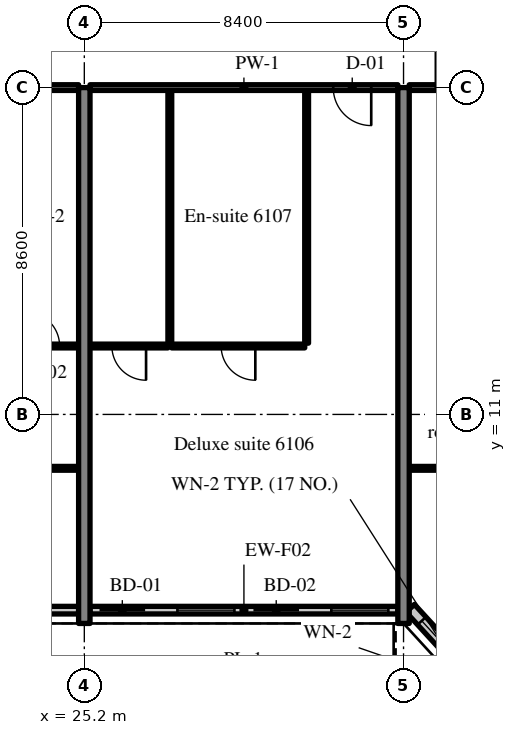
"""IFC4 building model, lengths in metres.
Left out: names, types, materials, properties, quantities, classifications, styles, units other than length and angle.
Written with IfcOpenShell. Run it as: python <this file> out.ifc"""

import sys

from ifc_helpers import new_model, si_unit, direction, frame, frame_2d, origin, place, context, subcontext, project, spatial, rectangle, extrude, source, transform, mapped, element, fill, save


model = new_model("IFC4")
c1 = context("Model", 3, precision=1e-05, world=origin(), true_north=direction((0.0, 1.0)))
c2 = subcontext(c1, "Body", "Model", "MODEL_VIEW")
j1 = project(units=[si_unit("LENGTHUNIT", "METRE"), si_unit("PLANEANGLEUNIT", "RADIAN")], contexts=[c1])
p1 = place(None, origin())
s1 = spatial("IfcSite", under=j1, at=p1, CompositionType="ELEMENT")
p2 = place(p1, origin())
s2 = spatial("IfcBuilding", under=s1, at=p2, CompositionType="ELEMENT")
p3 = place(p2, frame((0.0, 0.0, 253.0)))
s3 = spatial("IfcBuildingStorey", under=s2, at=p3, CompositionType="ELEMENT", Elevation=253.0)
m1 = source(origin(), c2, "Body", "SweptSolid", [
    extrude(rectangle(XDim=14.1, YDim=0.3, at=frame_2d((7.05, 0.0))), origin(), (0.0, 0.0, 1.0), 3.62),
])
for number, where, z_axis, x_axis in (
    (1, (25.2, 5.5, 0.0), (0.0, 0.0, 1.0), (0.0, 1.0, 0.0)),
    (2, (33.6, 5.5, 0.0), (0.0, 0.0, 1.0), (0.0, 1.0, 0.0)),
):
    element("IfcWall", number, at=place(p3, frame(where, z_axis=z_axis, x_axis=x_axis)), inside=s3, PredefinedType="SHEAR", context=c2, shape_type="MappedRepresentation", body=[
        mapped(m1, transform((0.0, 0.0, 0.0), scale=1.0)),
    ])
m2 = source(origin(), c2, "Body", "SweptSolid", [
    extrude(rectangle(XDim=6.505, YDim=0.2, at=frame_2d((3.252, 0.0))), origin(), (0.0, 0.0, 1.0), 3.02),
])
p4 = place(p3, frame((18.545, 5.85, 0.0), z_axis=(0.0, 0.0, 1.0), x_axis=(1.0, 0.0, 0.0)))
e3 = element("IfcWall", 3, at=p4, inside=s3, PredefinedType="SOLIDWALL", context=c2, shape_type="MappedRepresentation", body=[
    mapped(m2, transform((0.0, 0.0, 0.0), scale=1.0)),
])
m3 = source(origin(), c2, "Body", "SweptSolid", [
    extrude(rectangle(XDim=1.5, YDim=1.5, at=frame_2d((0.75, 0.75))), frame((0.0, 0.11, 0.0), z_axis=(0.0, -1.0, 0.0), x_axis=(1.0, 0.0, 0.0)), (0.0, 0.0, 1.0), 0.22),
])
p5 = place(p4, frame((0.876, 0.0, 0.9)))
e4 = element("IfcOpeningElement", 4, at=p5, cuts=e3, PredefinedType="OPENING", context=c2, shape_type="MappedRepresentation", body=[
    mapped(m3, transform((0.0, 0.0, 0.0), scale=1.0)),
])
p6 = place(p4, frame((4.129, 0.0, 0.9)))
e5 = element("IfcOpeningElement", 5, at=p6, cuts=e3, PredefinedType="OPENING", context=c2, shape_type="MappedRepresentation", body=[
    mapped(m3, transform((0.0, 0.0, 0.0), scale=1.0)),
])
m4 = source(origin(), c2, "Body", "SweptSolid", [
    extrude(rectangle(XDim=8.1, YDim=0.2, at=frame_2d((4.05, 0.0))), origin(), (0.0, 0.0, 1.0), 3.02),
])
p7 = place(p3, frame((25.35, 5.85, 0.0), z_axis=(0.0, 0.0, 1.0), x_axis=(1.0, 0.0, 0.0)))
e6 = element("IfcWall", 6, at=p7, inside=s3, PredefinedType="SOLIDWALL", context=c2, shape_type="MappedRepresentation", body=[
    mapped(m4, transform((0.0, 0.0, 0.0), scale=1.0)),
])
m5 = source(origin(), c2, "Body", "SweptSolid", [
    extrude(rectangle(XDim=1.2, YDim=2.4, at=frame_2d((0.6, 1.2))), frame((0.0, 0.11, 0.0), z_axis=(0.0, -1.0, 0.0), x_axis=(1.0, 0.0, 0.0)), (0.0, 0.0, 1.0), 0.22),
])
p8 = place(p7, frame((0.25, 0.0, 0.0)))
e7 = element("IfcOpeningElement", 7, at=p8, cuts=e6, PredefinedType="OPENING", context=c2, shape_type="MappedRepresentation", body=[
    mapped(m5, transform((0.0, 0.0, 0.0), scale=1.0)),
])
p9 = place(p7, frame((2.3, 0.0, 0.9)))
e8 = element("IfcOpeningElement", 8, at=p9, cuts=e6, PredefinedType="OPENING", context=c2, shape_type="MappedRepresentation", body=[
    mapped(m3, transform((0.0, 0.0, 0.0), scale=1.0)),
])
p10 = place(p7, frame((4.3, 0.0, 0.0)))
e9 = element("IfcOpeningElement", 9, at=p10, cuts=e6, PredefinedType="OPENING", context=c2, shape_type="MappedRepresentation", body=[
    mapped(m5, transform((0.0, 0.0, 0.0), scale=1.0)),
])
p11 = place(p7, frame((6.35, 0.0, 0.9)))
e10 = element("IfcOpeningElement", 10, at=p11, cuts=e6, PredefinedType="OPENING", context=c2, shape_type="MappedRepresentation", body=[
    mapped(m3, transform((0.0, 0.0, 0.0), scale=1.0)),
])
m6 = source(origin(), c2, "Body", "SweptSolid", [
    extrude(rectangle(XDim=2.398, YDim=0.3, at=frame_2d((1.199, 0.0))), origin(), (0.0, 0.0, 1.0), 3.62),
])
p12 = place(p3, frame((33.776, 5.9, 0.0), z_axis=(0.0, 0.0, 1.0), x_axis=(0.675374189419, -0.737475222815, 0.0)))
e11 = element("IfcWall", 11, at=p12, inside=s3, PredefinedType="SOLIDWALL", context=c2, shape_type="MappedRepresentation", body=[
    mapped(m6, transform((0.0, 0.0, 0.0), scale=1.0)),
])
m7 = source(origin(), c2, "Body", "SweptSolid", [
    extrude(rectangle(XDim=1.5, YDim=2.0, at=frame_2d((0.75, 1.0))), frame((0.0, 0.16, 0.0), z_axis=(0.0, -1.0, 0.0), x_axis=(1.0, 0.0, 0.0)), (0.0, 0.0, 1.0), 0.32),
])
p13 = place(p12, frame((0.449, 0.0, 0.9)))
e12 = element("IfcOpeningElement", 12, at=p13, cuts=e11, PredefinedType="OPENING", context=c2, shape_type="MappedRepresentation", body=[
    mapped(m7, transform((0.0, 0.0, 0.0), scale=1.0)),
])
m8 = source(origin(), c2, "Body", "SweptSolid", [
    extrude(rectangle(XDim=1.9, YDim=0.1, at=frame_2d((0.95, 0.0))), origin(), (0.0, 0.0, 1.0), 3.62),
])
p14 = place(p3, frame((23.15, 12.8, 0.0), z_axis=(0.0, 0.0, 1.0), x_axis=(1.0, 0.0, 0.0)))
e13 = element("IfcWall", 13, at=p14, inside=s3, PredefinedType="PARTITIONING", context=c2, shape_type="MappedRepresentation", body=[
    mapped(m8, transform((0.0, 0.0, 0.0), scale=1.0)),
])
m9 = source(origin(), c2, "Body", "SweptSolid", [
    extrude(rectangle(XDim=0.9, YDim=2.1, at=frame_2d((0.45, 1.05))), frame((0.0, 0.06, 0.0), z_axis=(0.0, -1.0, 0.0), x_axis=(1.0, 0.0, 0.0)), (0.0, 0.0, 1.0), 0.12),
])
p15 = place(p14, frame((0.5, 0.0, 0.0)))
e14 = element("IfcOpeningElement", 14, at=p15, cuts=e13, PredefinedType="OPENING", context=c2, shape_type="MappedRepresentation", body=[
    mapped(m9, transform((0.0, 0.0, 0.0), scale=1.0)),
])
m10 = source(origin(), c2, "Body", "SweptSolid", [
    extrude(rectangle(XDim=7.95, YDim=0.1, at=frame_2d((3.975, 0.0))), origin(), (0.0, 0.0, 1.0), 3.62),
])
p16 = place(p3, frame((17.1, 9.582, 0.0), z_axis=(0.0, 0.0, 1.0), x_axis=(1.0, 0.0, 0.0)))
e15 = element("IfcWall", 15, at=p16, inside=s3, PredefinedType="PARTITIONING", context=c2, shape_type="MappedRepresentation", body=[
    mapped(m10, transform((0.0, 0.0, 0.0), scale=1.0)),
])
m11 = source(origin(), c2, "Body", "SweptSolid", [
    extrude(rectangle(XDim=1.8, YDim=2.1, at=frame_2d((0.9, 1.05))), frame((0.0, 0.06, 0.0), z_axis=(0.0, -1.0, 0.0), x_axis=(1.0, 0.0, 0.0)), (0.0, 0.0, 1.0), 0.12),
])
p17 = place(p16, frame((3.075, 0.0, 0.0)))
e16 = element("IfcOpeningElement", 16, at=p17, cuts=e15, PredefinedType="OPENING", context=c2, shape_type="MappedRepresentation", body=[
    mapped(m11, transform((0.0, 0.0, 0.0), scale=1.0)),
])
m12 = source(origin(), c2, "Body", "SweptSolid", [
    extrude(rectangle(XDim=7.95, YDim=0.15, at=frame_2d((3.975, 0.0))), origin(), (0.0, 0.0, 1.0), 2.92),
])
p18 = place(p3, frame((17.1, 19.6, 0.0), z_axis=(0.0, 0.0, 1.0), x_axis=(1.0, 0.0, 0.0)))
e17 = element("IfcWall", 17, at=p18, inside=s3, PredefinedType="PARTITIONING", context=c2, shape_type="MappedRepresentation", body=[
    mapped(m12, transform((0.0, 0.0, 0.0), scale=1.0)),
])
m13 = source(origin(), c2, "Body", "SweptSolid", [
    extrude(rectangle(XDim=1.0, YDim=2.1, at=frame_2d((0.5, 1.05))), frame((0.0, 0.085, 0.0), z_axis=(0.0, -1.0, 0.0), x_axis=(1.0, 0.0, 0.0)), (0.0, 0.0, 1.0), 0.17),
])
p19 = place(p18, frame((0.7, 0.0, 0.0)))
e18 = element("IfcOpeningElement", 18, at=p19, cuts=e17, PredefinedType="OPENING", context=c2, shape_type="MappedRepresentation", body=[
    mapped(m13, transform((0.0, 0.0, 0.0), scale=1.0)),
])
m14 = source(origin(), c2, "Body", "SweptSolid", [
    extrude(rectangle(XDim=6.65, YDim=0.1, at=frame_2d((3.325, 0.0))), origin(), (0.0, 0.0, 1.0), 3.62),
])
for number, where, z_axis, x_axis in (
    (19, (31.05, 12.875, 0.0), (0.0, 0.0, 1.0), (0.0, 1.0, 0.0)),
    (20, (27.45, 12.875, 0.0), (0.0, 0.0, 1.0), (0.0, 1.0, 0.0)),
):
    element("IfcWall", number, at=place(p3, frame(where, z_axis=z_axis, x_axis=x_axis)), inside=s3, PredefinedType="PARTITIONING", context=c2, shape_type="MappedRepresentation", body=[
        mapped(m14, transform((0.0, 0.0, 0.0), scale=1.0)),
    ])
m15 = source(origin(), c2, "Body", "SweptSolid", [
    extrude(rectangle(XDim=3.5, YDim=0.1, at=frame_2d((1.75, 0.0))), origin(), (0.0, 0.0, 1.0), 3.62),
])
p20 = place(p3, frame((27.5, 12.8, 0.0), z_axis=(0.0, 0.0, 1.0), x_axis=(1.0, 0.0, 0.0)))
e21 = element("IfcWall", 21, at=p20, inside=s3, PredefinedType="PARTITIONING", context=c2, shape_type="MappedRepresentation", body=[
    mapped(m15, transform((0.0, 0.0, 0.0), scale=1.0)),
])
p21 = place(p20, frame((1.3, 0.0, 0.0)))
e22 = element("IfcOpeningElement", 22, at=p21, cuts=e21, PredefinedType="OPENING", context=c2, shape_type="MappedRepresentation", body=[
    mapped(m9, transform((0.0, 0.0, 0.0), scale=1.0)),
])
m16 = source(origin(), c2, "Body", "SweptSolid", [
    extrude(rectangle(XDim=2.05, YDim=0.1, at=frame_2d((1.025, 0.0))), origin(), (0.0, 0.0, 1.0), 3.62),
])
p22 = place(p3, frame((25.35, 12.8, 0.0), z_axis=(0.0, 0.0, 1.0), x_axis=(1.0, 0.0, 0.0)))
e23 = element("IfcWall", 23, at=p22, inside=s3, PredefinedType="PARTITIONING", context=c2, shape_type="MappedRepresentation", body=[
    mapped(m16, transform((0.0, 0.0, 0.0), scale=1.0)),
])
p23 = place(p22, frame((0.575, 0.0, 0.0)))
e24 = element("IfcOpeningElement", 24, at=p23, cuts=e23, PredefinedType="OPENING", context=c2, shape_type="MappedRepresentation", body=[
    mapped(m9, transform((0.0, 0.0, 0.0), scale=1.0)),
])
m17 = source(origin(), c2, "Body", "SweptSolid", [
    extrude(rectangle(XDim=8.1, YDim=0.15, at=frame_2d((4.05, 0.0))), origin(), (0.0, 0.0, 1.0), 2.92),
])
p24 = place(p3, frame((25.35, 19.6, 0.0), z_axis=(0.0, 0.0, 1.0), x_axis=(1.0, 0.0, 0.0)))
e25 = element("IfcWall", 25, at=p24, inside=s3, PredefinedType="PARTITIONING", context=c2, shape_type="MappedRepresentation", body=[
    mapped(m17, transform((0.0, 0.0, 0.0), scale=1.0)),
])
p25 = place(p24, frame((6.4, 0.0, 0.0)))
e26 = element("IfcOpeningElement", 26, at=p25, cuts=e25, PredefinedType="OPENING", context=c2, shape_type="MappedRepresentation", body=[
    mapped(m13, transform((0.0, 0.0, 0.0), scale=1.0)),
])
m18 = source(origin(), c2, "Body", "SweptSolid", [
    extrude(rectangle(XDim=8.1, YDim=0.1, at=frame_2d((4.05, 0.0))), origin(), (0.0, 0.0, 1.0), 3.62),
])
p26 = place(p3, frame((33.75, 9.582, 0.0), z_axis=(0.0, 0.0, 1.0), x_axis=(1.0, 0.0, 0.0)))
e27 = element("IfcWall", 27, at=p26, inside=s3, PredefinedType="PARTITIONING", context=c2, shape_type="MappedRepresentation", body=[
    mapped(m18, transform((0.0, 0.0, 0.0), scale=1.0)),
])
p27 = place(p26, frame((3.15, 0.0, 0.0)))
e28 = element("IfcOpeningElement", 28, at=p27, cuts=e27, PredefinedType="OPENING", context=c2, shape_type="MappedRepresentation", body=[
    mapped(m11, transform((0.0, 0.0, 0.0), scale=1.0)),
])
m19 = source(origin(), c2, "Body", "SweptSolid", [
    extrude(rectangle(XDim=8.1, YDim=0.15, at=frame_2d((4.05, 0.0))), origin(), (0.0, 0.0, 1.0), 2.92),
])
p28 = place(p3, frame((33.75, 19.6, 0.0), z_axis=(0.0, 0.0, 1.0), x_axis=(1.0, 0.0, 0.0)))
e29 = element("IfcWall", 29, at=p28, inside=s3, PredefinedType="PARTITIONING", context=c2, shape_type="MappedRepresentation", body=[
    mapped(m19, transform((0.0, 0.0, 0.0), scale=1.0)),
])
p29 = place(p28, frame((0.7, 0.0, 0.0)))
e30 = element("IfcOpeningElement", 30, at=p29, cuts=e29, PredefinedType="OPENING", context=c2, shape_type="MappedRepresentation", body=[
    mapped(m13, transform((0.0, 0.0, 0.0), scale=1.0)),
])
m20 = source(origin(), c2, "Body", "SweptSolid", [
    extrude(rectangle(XDim=1.2, YDim=2.4, at=frame_2d((0.6, 1.2))), frame((0.0, 0.025, 0.0), z_axis=(0.0, -1.0, 0.0), x_axis=(1.0, 0.0, 0.0)), (0.0, 0.0, 1.0), 0.05),
])
p30 = place(p8, origin())
e31 = element("IfcDoor", 31, at=p30, inside=s3, OperationType="SLIDING_TO_LEFT", PredefinedType="DOOR", context=c2, shape_type="MappedRepresentation", body=[
    mapped(m20, transform((0.0, 0.0, 0.0), scale=1.0)),
])
fill(e7, e31)
m21 = source(origin(), c2, "Body", "SweptSolid", [
    extrude(rectangle(XDim=1.5, YDim=1.5, at=frame_2d((0.75, 0.75))), frame((0.0, 0.03, 0.0), z_axis=(0.0, -1.0, 0.0), x_axis=(1.0, 0.0, 0.0)), (0.0, 0.0, 1.0), 0.06),
])
p31 = place(p9, origin())
e32 = element("IfcWindow", 32, at=p31, inside=s3, PartitioningType="SINGLE_PANEL", PredefinedType="WINDOW", context=c2, shape_type="MappedRepresentation", body=[
    mapped(m21, transform((0.0, 0.0, 0.0), scale=1.0)),
])
fill(e8, e32)
p32 = place(p10, origin())
e33 = element("IfcDoor", 33, at=p32, inside=s3, OperationType="SLIDING_TO_RIGHT", PredefinedType="DOOR", context=c2, shape_type="MappedRepresentation", body=[
    mapped(m20, transform((0.0, 0.0, 0.0), scale=1.0)),
])
fill(e9, e33)
p33 = place(p11, origin())
e34 = element("IfcWindow", 34, at=p33, inside=s3, PartitioningType="SINGLE_PANEL", PredefinedType="WINDOW", context=c2, shape_type="MappedRepresentation", body=[
    mapped(m21, transform((0.0, 0.0, 0.0), scale=1.0)),
])
fill(e10, e34)
m22 = source(origin(), c2, "Body", "SweptSolid", [
    extrude(rectangle(XDim=1.5, YDim=2.0, at=frame_2d((0.75, 1.0))), frame((0.0, 0.03, 0.0), z_axis=(0.0, -1.0, 0.0), x_axis=(1.0, 0.0, 0.0)), (0.0, 0.0, 1.0), 0.06),
])
p34 = place(p13, origin())
e35 = element("IfcWindow", 35, at=p34, inside=s3, PartitioningType="SINGLE_PANEL", PredefinedType="WINDOW", context=c2, shape_type="MappedRepresentation", body=[
    mapped(m22, transform((0.0, 0.0, 0.0), scale=1.0)),
])
fill(e12, e35)
m23 = source(origin(), c2, "Body", "SweptSolid", [
    extrude(rectangle(XDim=0.9, YDim=2.1, at=frame_2d((0.45, 1.05))), frame((0.0, 0.025, 0.0), z_axis=(0.0, -1.0, 0.0), x_axis=(1.0, 0.0, 0.0)), (0.0, 0.0, 1.0), 0.05),
])
p35 = place(p15, origin())
e36 = element("IfcDoor", 36, at=p35, inside=s3, OperationType="SINGLE_SWING_LEFT", PredefinedType="DOOR", context=c2, shape_type="MappedRepresentation", body=[
    mapped(m23, transform((0.0, 0.0, 0.0), scale=1.0)),
])
fill(e14, e36)
p36 = place(p21, origin())
e37 = element("IfcDoor", 37, at=p36, inside=s3, OperationType="SINGLE_SWING_RIGHT", PredefinedType="DOOR", context=c2, shape_type="MappedRepresentation", body=[
    mapped(m23, transform((0.0, 0.0, 0.0), scale=1.0)),
])
fill(e22, e37)
p37 = place(p23, origin())
e38 = element("IfcDoor", 38, at=p37, inside=s3, OperationType="SINGLE_SWING_RIGHT", PredefinedType="DOOR", context=c2, shape_type="MappedRepresentation", body=[
    mapped(m23, transform((0.0, 0.0, 0.0), scale=1.0)),
])
fill(e24, e38)
m24 = source(origin(), c2, "Body", "SweptSolid", [
    extrude(rectangle(XDim=1.0, YDim=2.1, at=frame_2d((0.5, 1.05))), frame((0.0, 0.025, 0.0), z_axis=(0.0, -1.0, 0.0), x_axis=(1.0, 0.0, 0.0)), (0.0, 0.0, 1.0), 0.05),
])
p38 = place(p25, origin())
e39 = element("IfcDoor", 39, at=p38, inside=s3, OperationType="SINGLE_SWING_RIGHT", PredefinedType="DOOR", context=c2, shape_type="MappedRepresentation", body=[
    mapped(m24, transform((0.0, 0.0, 0.0), scale=1.0)),
])
fill(e26, e39)
save(model, sys.argv[1])
